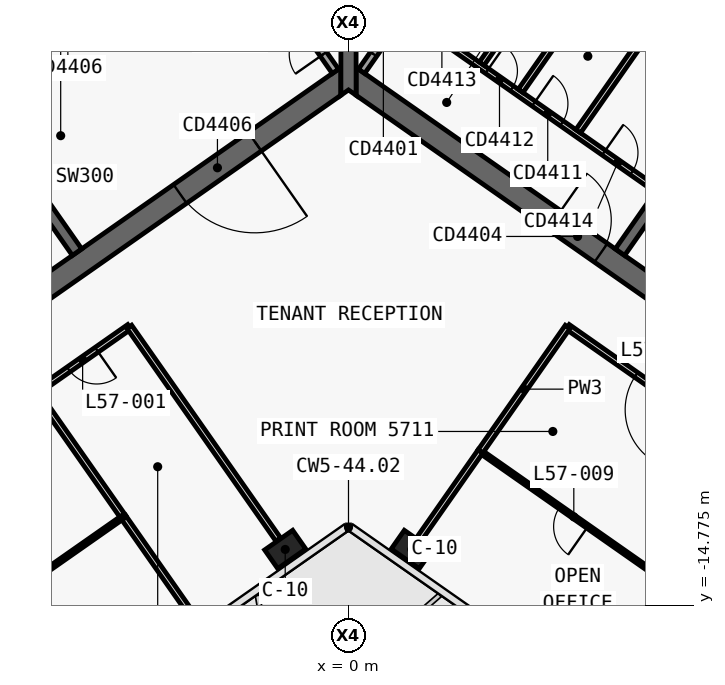
"""IFC4 building model, lengths in metres.
Left out: names, types, materials, properties, quantities, classifications, styles, units other than length and angle.
Written with IfcOpenShell. Run it as: python <this file> out.ifc"""

import sys

from ifc_helpers import new_model, si_unit, direction, frame, frame_2d, origin, origin_2d, place, context, subcontext, project, spatial, polyline, rectangle, outline, extrude, element, fill, save


model = new_model("IFC4")
c1 = context("Model", 3, precision=1e-05, world=origin(), true_north=direction((0.0, 1.0)))
c2 = subcontext(c1, "Body", "Model", "MODEL_VIEW")
j1 = project(units=[si_unit("LENGTHUNIT", "METRE"), si_unit("PLANEANGLEUNIT", "RADIAN")], contexts=[c1])
p1 = place(None, origin())
s1 = spatial("IfcSite", under=j1, at=p1, CompositionType="ELEMENT")
p2 = place(p1, origin())
s2 = spatial("IfcBuilding", under=s1, at=p2, CompositionType="ELEMENT")
p3 = place(p2, frame((0.0, 0.0, 244.9)))
s3 = spatial("IfcBuildingStorey", under=s2, at=p3, CompositionType="ELEMENT", Elevation=244.9)
p4 = place(p3, frame((-0.028, 12.066, 0.0), z_axis=(0.0, 0.0, 1.0), x_axis=(-0.819151382952, -0.573577380837, 0.0)))
e1 = element("IfcWall", 1, at=p4, inside=s3, PredefinedType="SHEAR", context=c2, shape_type="SweptSolid", body=[
    extrude(outline(polyline([(33.898, 0.3), (0.42, 0.3), (0.0, -0.3), (33.898, -0.3), (33.898, 0.3)])), origin(), (0.0, 0.0, 1.0), 3.9),
])
p5 = place(p3, frame((-0.028, -0.874, 0.0), z_axis=(0.0, 0.0, 1.0), x_axis=(-0.819150035022, -0.573579305871, 0.0)))
e2 = element("IfcWall", 2, at=p5, inside=s3, PredefinedType="SHEAR", context=c2, shape_type="SweptSolid", body=[
    extrude(outline(polyline([(26.476, 0.3), (0.42, 0.3), (0.0, -0.3), (26.476, -0.3), (26.476, 0.3)])), origin(), (0.0, 0.0, 1.0), 3.9),
])
p6 = place(p5, frame((2.976, 0.0, 0.0)))
e3 = element("IfcOpeningElement", 3, at=p6, cuts=e2, PredefinedType="OPENING", context=c2, shape_type="SweptSolid", body=[
    extrude(rectangle(XDim=2.4, YDim=2.1, at=frame_2d((1.2, 1.05))), frame((0.0, 0.31, 0.0), z_axis=(0.0, -1.0, 0.0), x_axis=(1.0, 0.0, 0.0)), (0.0, 0.0, 1.0), 0.62),
])
p7 = place(p5, frame((11.776, 0.0, 0.0)))
e4 = element("IfcOpeningElement", 4, at=p7, cuts=e2, PredefinedType="OPENING", context=c2, shape_type="SweptSolid", body=[
    extrude(rectangle(XDim=2.4, YDim=2.1, at=frame_2d((1.2, 1.05))), frame((0.0, 0.31, 0.0), z_axis=(0.0, -1.0, 0.0), x_axis=(1.0, 0.0, 0.0)), (0.0, 0.0, 1.0), 0.62),
])
p8 = place(p3, frame((-7.143, -5.49, 0.0), z_axis=(0.0, 0.0, 1.0), x_axis=(-0.573617744349, 0.819123118565, 0.0)))
e5 = element("IfcWall", 5, at=p8, inside=s3, PredefinedType="SHEAR", context=c2, shape_type="SweptSolid", body=[
    extrude(outline(polyline([(4.85, 0.15), (0.0, 0.15), (0.0, -0.15), (4.85, -0.15), (4.85, 0.15)])), origin(), (0.0, 0.0, 1.0), 3.9),
])
p9 = place(p3, frame((-2.638, 3.768, 0.0), z_axis=(0.0, 0.0, 1.0), x_axis=(-0.819155014212, -0.573572194837, 0.0)))
e6 = element("IfcWall", 6, at=p9, inside=s3, PredefinedType="SHEAR", context=c2, shape_type="SweptSolid", body=[
    extrude(outline(polyline([(26.4, 0.15), (0.0, 0.15), (0.0, -0.15), (26.4, -0.15), (26.4, 0.15)])), origin(), (0.0, 0.0, 1.0), 3.9),
])
p10 = place(p9, frame((1.169, 0.0, 0.0)))
e7 = element("IfcOpeningElement", 7, at=p10, cuts=e6, PredefinedType="OPENING", context=c2, shape_type="SweptSolid", body=[
    extrude(rectangle(XDim=1.1, YDim=2.1, at=frame_2d((0.55, 1.05))), frame((0.0, 0.16, 0.0), z_axis=(0.0, -1.0, 0.0), x_axis=(1.0, 0.0, 0.0)), (0.0, 0.0, 1.0), 0.32),
])
p11 = place(p9, frame((3.206, 0.0, 0.0)))
e8 = element("IfcOpeningElement", 8, at=p11, cuts=e6, PredefinedType="OPENING", context=c2, shape_type="SweptSolid", body=[
    extrude(rectangle(XDim=1.1, YDim=2.1, at=frame_2d((0.55, 1.05))), frame((0.0, 0.16, 0.0), z_axis=(0.0, -1.0, 0.0), x_axis=(1.0, 0.0, 0.0)), (0.0, 0.0, 1.0), 0.32),
])
p12 = place(p9, frame((5.244, 0.0, 0.0)))
e9 = element("IfcOpeningElement", 9, at=p12, cuts=e6, PredefinedType="OPENING", context=c2, shape_type="SweptSolid", body=[
    extrude(rectangle(XDim=1.1, YDim=2.1, at=frame_2d((0.55, 1.05))), frame((0.0, 0.16, 0.0), z_axis=(0.0, -1.0, 0.0), x_axis=(1.0, 0.0, 0.0)), (0.0, 0.0, 1.0), 0.32),
])
p13 = place(p9, frame((7.281, 0.0, 0.0)))
e10 = element("IfcOpeningElement", 10, at=p13, cuts=e6, PredefinedType="OPENING", context=c2, shape_type="SweptSolid", body=[
    extrude(rectangle(XDim=1.1, YDim=2.1, at=frame_2d((0.55, 1.05))), frame((0.0, 0.16, 0.0), z_axis=(0.0, -1.0, 0.0), x_axis=(1.0, 0.0, 0.0)), (0.0, 0.0, 1.0), 0.32),
])
p14 = place(p9, frame((9.688, 0.0, 0.0)))
e11 = element("IfcOpeningElement", 11, at=p14, cuts=e6, PredefinedType="OPENING", context=c2, shape_type="SweptSolid", body=[
    extrude(rectangle(XDim=1.1, YDim=2.1, at=frame_2d((0.55, 1.05))), frame((0.0, 0.16, 0.0), z_axis=(0.0, -1.0, 0.0), x_axis=(1.0, 0.0, 0.0)), (0.0, 0.0, 1.0), 0.32),
])
p15 = place(p9, frame((11.863, 0.0, 0.0)))
e12 = element("IfcOpeningElement", 12, at=p15, cuts=e6, PredefinedType="OPENING", context=c2, shape_type="SweptSolid", body=[
    extrude(rectangle(XDim=1.1, YDim=2.1, at=frame_2d((0.55, 1.05))), frame((0.0, 0.16, 0.0), z_axis=(0.0, -1.0, 0.0), x_axis=(1.0, 0.0, 0.0)), (0.0, 0.0, 1.0), 0.32),
])
p16 = place(p9, frame((14.552, 0.0, 0.0)))
e13 = element("IfcOpeningElement", 13, at=p16, cuts=e6, PredefinedType="OPENING", context=c2, shape_type="SweptSolid", body=[
    extrude(rectangle(XDim=1.0, YDim=2.1, at=frame_2d((0.5, 1.05))), frame((0.0, 0.16, 0.0), z_axis=(0.0, -1.0, 0.0), x_axis=(1.0, 0.0, 0.0)), (0.0, 0.0, 1.0), 0.32),
])
p17 = place(p9, frame((16.627, 0.0, 0.0)))
e14 = element("IfcOpeningElement", 14, at=p17, cuts=e6, PredefinedType="OPENING", context=c2, shape_type="SweptSolid", body=[
    extrude(rectangle(XDim=1.0, YDim=2.1, at=frame_2d((0.5, 1.05))), frame((0.0, 0.16, 0.0), z_axis=(0.0, -1.0, 0.0), x_axis=(1.0, 0.0, 0.0)), (0.0, 0.0, 1.0), 0.32),
])
p18 = place(p3, frame((0.028, 12.066, 0.0), z_axis=(0.0, 0.0, 1.0), x_axis=(0.819151382952, -0.573577380837, 0.0)))
e15 = element("IfcWall", 15, at=p18, inside=s3, PredefinedType="SHEAR", context=c2, shape_type="SweptSolid", body=[
    extrude(outline(polyline([(33.898, 0.3), (0.0, 0.3), (0.42, -0.3), (33.898, -0.3), (33.898, 0.3)])), origin(), (0.0, 0.0, 1.0), 3.9),
])
p19 = place(p3, frame((0.028, -0.874, 0.0), z_axis=(0.0, 0.0, 1.0), x_axis=(0.819150035022, -0.573579305871, 0.0)))
e16 = element("IfcWall", 16, at=p19, inside=s3, PredefinedType="SHEAR", context=c2, shape_type="SweptSolid", body=[
    extrude(outline(polyline([(26.476, 0.3), (0.0, 0.3), (0.42, -0.3), (26.476, -0.3), (26.476, 0.3)])), origin(), (0.0, 0.0, 1.0), 3.9),
])
p20 = place(p19, frame((6.576, 0.0, 0.0)))
e17 = element("IfcOpeningElement", 17, at=p20, cuts=e16, PredefinedType="OPENING", context=c2, shape_type="SweptSolid", body=[
    extrude(rectangle(XDim=1.5, YDim=2.1, at=frame_2d((0.75, 1.05))), frame((0.0, 0.31, 0.0), z_axis=(0.0, -1.0, 0.0), x_axis=(1.0, 0.0, 0.0)), (0.0, 0.0, 1.0), 0.62),
])
p21 = place(p19, frame((12.226, 0.0, 0.0)))
e18 = element("IfcOpeningElement", 18, at=p21, cuts=e16, PredefinedType="OPENING", context=c2, shape_type="SweptSolid", body=[
    extrude(rectangle(XDim=1.5, YDim=2.1, at=frame_2d((0.75, 1.05))), frame((0.0, 0.31, 0.0), z_axis=(0.0, -1.0, 0.0), x_axis=(1.0, 0.0, 0.0)), (0.0, 0.0, 1.0), 0.62),
])
p22 = place(p3, frame((7.143, -5.49, 0.0), z_axis=(0.0, 0.0, 1.0), x_axis=(0.573617744349, 0.819123118565, 0.0)))
e19 = element("IfcWall", 19, at=p22, inside=s3, PredefinedType="SHEAR", context=c2, shape_type="SweptSolid", body=[
    extrude(outline(polyline([(0.0, 0.15), (0.0, -0.15), (4.85, -0.15), (4.85, 0.15), (0.0, 0.15)])), origin(), (0.0, 0.0, 1.0), 3.9),
])
p23 = place(p3, frame((2.638, 3.768, 0.0), z_axis=(0.0, 0.0, 1.0), x_axis=(0.819155014212, -0.573572194837, 0.0)))
e20 = element("IfcWall", 20, at=p23, inside=s3, PredefinedType="SHEAR", context=c2, shape_type="SweptSolid", body=[
    extrude(outline(polyline([(0.0, 0.15), (0.0, -0.15), (26.4, -0.15), (26.4, 0.15), (0.0, 0.15)])), origin(), (0.0, 0.0, 1.0), 3.9),
])
p24 = place(p23, frame((9.637, 0.0, 0.0)))
e21 = element("IfcOpeningElement", 21, at=p24, cuts=e20, PredefinedType="OPENING", context=c2, shape_type="SweptSolid", body=[
    extrude(rectangle(XDim=1.2, YDim=2.1, at=frame_2d((0.6, 1.05))), frame((0.0, 0.16, 0.0), z_axis=(0.0, -1.0, 0.0), x_axis=(1.0, 0.0, 0.0)), (0.0, 0.0, 1.0), 0.32),
])
p25 = place(p23, frame((11.812, 0.0, 0.0)))
e22 = element("IfcOpeningElement", 22, at=p25, cuts=e20, PredefinedType="OPENING", context=c2, shape_type="SweptSolid", body=[
    extrude(rectangle(XDim=1.2, YDim=2.1, at=frame_2d((0.6, 1.05))), frame((0.0, 0.16, 0.0), z_axis=(0.0, -1.0, 0.0), x_axis=(1.0, 0.0, 0.0)), (0.0, 0.0, 1.0), 0.32),
])
p26 = place(p23, frame((13.988, 0.0, 0.0)))
e23 = element("IfcOpeningElement", 23, at=p26, cuts=e20, PredefinedType="OPENING", context=c2, shape_type="SweptSolid", body=[
    extrude(rectangle(XDim=1.2, YDim=2.1, at=frame_2d((0.6, 1.05))), frame((0.0, 0.16, 0.0), z_axis=(0.0, -1.0, 0.0), x_axis=(1.0, 0.0, 0.0)), (0.0, 0.0, 1.0), 0.32),
])
p27 = place(p23, frame((16.262, 0.0, 0.0)))
e24 = element("IfcOpeningElement", 24, at=p27, cuts=e20, PredefinedType="OPENING", context=c2, shape_type="SweptSolid", body=[
    extrude(rectangle(XDim=1.0, YDim=2.1, at=frame_2d((0.5, 1.05))), frame((0.0, 0.16, 0.0), z_axis=(0.0, -1.0, 0.0), x_axis=(1.0, 0.0, 0.0)), (0.0, 0.0, 1.0), 0.32),
])
p28 = place(p3, frame((0.0, -1.361, 0.0), z_axis=(0.0, 0.0, 1.0), x_axis=(0.0, 1.0, 0.0)))
e25 = element("IfcWall", 25, at=p28, inside=s3, PredefinedType="SHEAR", context=c2, shape_type="SweptSolid", body=[
    extrude(outline(polyline([(0.14, 0.2), (0.0, 0.2), (0.14, 0.0), (0.0, -0.2), (0.14, -0.2), (1.012, -0.2), (12.94, -0.2), (13.813, -0.2), (13.893, -0.2), (13.933, -0.172), (13.813, 0.0), (13.933, 0.172), (13.893, 0.2), (13.813, 0.2), (12.94, 0.2), (1.012, 0.2), (0.14, 0.2)])), origin(), (0.0, 0.0, 1.0), 3.9),
])
for number, where, z_axis, x_axis in (
    (26, (-1.665, -13.313, 0.0), (0.0, 0.0, 1.0), (-0.819, -0.574, 0.0)),
    (27, (1.665, -13.313, 0.0), (0.0, 0.0, 1.0), (0.819, -0.574, 0.0)),
):
    element("IfcColumn", number, at=place(p3, frame(where, z_axis=z_axis, x_axis=x_axis)), inside=s3, PredefinedType="COLUMN", context=c2, shape_type="SweptSolid", body=[
        extrude(rectangle(XDim=0.9, YDim=0.6, at=origin_2d()), origin(), (0.0, 0.0, 1.0), 3.9),
    ])
p29 = place(p3, frame((1.516, 0.77, 0.0), z_axis=(0.0, 0.0, 1.0), x_axis=(0.819146424436, -0.573584462249, 0.0)))
e28 = element("IfcWall", 28, at=p29, inside=s3, PredefinedType="PARTITIONING", context=c2, shape_type="SweptSolid", body=[
    extrude(rectangle(XDim=8.05, YDim=0.15, at=frame_2d((4.025, 0.0))), origin(), (0.0, 0.0, 1.0), 3.62),
])
p30 = place(p29, frame((0.7, 0.0, 0.0)))
e29 = element("IfcOpeningElement", 29, at=p30, cuts=e28, PredefinedType="OPENING", context=c2, shape_type="SweptSolid", body=[
    extrude(rectangle(XDim=0.9, YDim=2.1, at=frame_2d((0.45, 1.05))), frame((0.0, 0.085, 0.0), z_axis=(0.0, -1.0, 0.0), x_axis=(1.0, 0.0, 0.0)), (0.0, 0.0, 1.0), 0.17),
])
p31 = place(p29, frame((2.6, 0.0, 0.0)))
e30 = element("IfcOpeningElement", 30, at=p31, cuts=e28, PredefinedType="OPENING", context=c2, shape_type="SweptSolid", body=[
    extrude(rectangle(XDim=0.8, YDim=2.1, at=frame_2d((0.4, 1.05))), frame((0.0, 0.085, 0.0), z_axis=(0.0, -1.0, 0.0), x_axis=(1.0, 0.0, 0.0)), (0.0, 0.0, 1.0), 0.17),
])
p32 = place(p29, frame((4.1, 0.0, 0.0)))
e31 = element("IfcOpeningElement", 31, at=p32, cuts=e28, PredefinedType="OPENING", context=c2, shape_type="SweptSolid", body=[
    extrude(rectangle(XDim=0.9, YDim=2.1, at=frame_2d((0.45, 1.05))), frame((0.0, 0.085, 0.0), z_axis=(0.0, -1.0, 0.0), x_axis=(1.0, 0.0, 0.0)), (0.0, 0.0, 1.0), 0.17),
])
p33 = place(p29, frame((6.35, 0.0, 0.0)))
e32 = element("IfcOpeningElement", 32, at=p33, cuts=e28, PredefinedType="OPENING", context=c2, shape_type="SweptSolid", body=[
    extrude(rectangle(XDim=0.9, YDim=2.1, at=frame_2d((0.45, 1.05))), frame((0.0, 0.085, 0.0), z_axis=(0.0, -1.0, 0.0), x_axis=(1.0, 0.0, 0.0)), (0.0, 0.0, 1.0), 0.17),
])
p34 = place(p3, frame((3.504, -0.531, 0.0), z_axis=(0.0, 0.0, 1.0), x_axis=(0.573582013179, 0.819148139324, 0.0)))
e33 = element("IfcWall", 33, at=p34, inside=s3, PredefinedType="PARTITIONING", context=c2, shape_type="SweptSolid", body=[
    extrude(rectangle(XDim=2.875, YDim=0.15, at=frame_2d((1.438, 0.0))), origin(), (0.0, 0.0, 1.0), 3.62),
])
p35 = place(p3, frame((4.528, -1.248, 0.0), z_axis=(0.0, 0.0, 1.0), x_axis=(0.573621911162, 0.819120200602, 0.0)))
e34 = element("IfcWall", 34, at=p35, inside=s3, PredefinedType="PARTITIONING", context=c2, shape_type="SweptSolid", body=[
    extrude(rectangle(XDim=2.875, YDim=0.15, at=frame_2d((1.438, 0.0))), origin(), (0.0, 0.0, 1.0), 3.62),
])
p36 = place(p3, frame((6.044, -2.309, 0.0), z_axis=(0.0, 0.0, 1.0), x_axis=(0.573564930514, 0.819160100642, 0.0)))
e35 = element("IfcWall", 35, at=p36, inside=s3, PredefinedType="PARTITIONING", context=c2, shape_type="SweptSolid", body=[
    extrude(rectangle(XDim=2.875, YDim=0.15, at=frame_2d((1.438, 0.0))), origin(), (0.0, 0.0, 1.0), 3.62),
])
p37 = place(p3, frame((-0.344, -0.729, 0.0), z_axis=(0.0, 0.0, 1.0), x_axis=(-0.573560315113, 0.819163332265, 0.0)))
e36 = element("IfcWall", 36, at=p37, inside=s3, PredefinedType="SOLIDWALL", context=c2, shape_type="SweptSolid", body=[
    extrude(rectangle(XDim=4.85, YDim=0.2, at=frame_2d((2.425, 0.0))), origin(), (0.0, 0.0, 1.0), 3.62),
])
p38 = place(p37, frame((0.55, 0.0, 0.0)))
e37 = element("IfcOpeningElement", 37, at=p38, cuts=e36, PredefinedType="OPENING", context=c2, shape_type="SweptSolid", body=[
    extrude(rectangle(XDim=0.9, YDim=2.1, at=frame_2d((0.45, 1.05))), frame((0.0, 0.11, 0.0), z_axis=(0.0, -1.0, 0.0), x_axis=(1.0, 0.0, 0.0)), (0.0, 0.0, 1.0), 0.22),
])
p39 = place(p3, frame((0.344, -0.729, 0.0), z_axis=(0.0, 0.0, 1.0), x_axis=(0.573560315113, 0.819163332265, 0.0)))
e38 = element("IfcWall", 38, at=p39, inside=s3, PredefinedType="SOLIDWALL", context=c2, shape_type="SweptSolid", body=[
    extrude(rectangle(XDim=4.85, YDim=0.2, at=frame_2d((2.425, 0.0))), origin(), (0.0, 0.0, 1.0), 3.62),
])
p40 = place(p39, frame((0.55, 0.0, 0.0)))
e39 = element("IfcOpeningElement", 39, at=p40, cuts=e38, PredefinedType="OPENING", context=c2, shape_type="SweptSolid", body=[
    extrude(rectangle(XDim=0.9, YDim=2.1, at=frame_2d((0.45, 1.05))), frame((0.0, 0.11, 0.0), z_axis=(0.0, -1.0, 0.0), x_axis=(1.0, 0.0, 0.0)), (0.0, 0.0, 1.0), 0.22),
])
p41 = place(p3, frame((10.683, -10.898, 0.0), z_axis=(0.0, 0.0, 1.0), x_axis=(-0.819147828287, 0.573582457378, 0.0)))
e40 = element("IfcWall", 40, at=p41, inside=s3, PredefinedType="PARTITIONING", context=c2, shape_type="SweptSolid", body=[
    extrude(rectangle(XDim=6.002, YDim=0.15, at=frame_2d((3.001, 0.0))), origin(), (0.0, 0.0, 1.0), 3.05),
])
p42 = place(p41, frame((2.201, 0.0, 0.0)))
e41 = element("IfcOpeningElement", 41, at=p42, cuts=e40, PredefinedType="OPENING", context=c2, shape_type="SweptSolid", body=[
    extrude(rectangle(XDim=1.6, YDim=2.1, at=frame_2d((0.8, 1.05))), frame((0.0, 0.085, 0.0), z_axis=(0.0, -1.0, 0.0), x_axis=(1.0, 0.0, 0.0)), (0.0, 0.0, 1.0), 0.17),
])
p43 = place(p3, frame((-5.766, -7.456, 0.0), z_axis=(0.0, 0.0, 1.0), x_axis=(-0.81915932427, -0.57356603932, 0.0)))
e42 = element("IfcWall", 42, at=p43, inside=s3, PredefinedType="PARTITIONING", context=c2, shape_type="SweptSolid", body=[
    extrude(rectangle(XDim=3.002, YDim=0.15, at=frame_2d((1.501, 0.0))), origin(), (0.0, 0.0, 1.0), 3.05),
])
p44 = place(p43, frame((1.051, 0.0, 0.0)))
e43 = element("IfcOpeningElement", 43, at=p44, cuts=e42, PredefinedType="OPENING", context=c2, shape_type="SweptSolid", body=[
    extrude(rectangle(XDim=0.9, YDim=2.1, at=frame_2d((0.45, 1.05))), frame((0.0, 0.085, 0.0), z_axis=(0.0, -1.0, 0.0), x_axis=(1.0, 0.0, 0.0)), (0.0, 0.0, 1.0), 0.17),
])
p45 = place(p3, frame((8.386, -14.175, 0.0), z_axis=(0.0, 0.0, 1.0), x_axis=(-0.819143979704, 0.5735879536, 0.0)))
e44 = element("IfcWall", 44, at=p45, inside=s3, PredefinedType="PARTITIONING", context=c2, shape_type="SweptSolid", body=[
    extrude(rectangle(XDim=6.0, YDim=0.1, at=frame_2d((3.0, 0.0))), origin(), (0.0, 0.0, 1.0), 3.05),
])
p46 = place(p45, frame((2.55, 0.0, 0.0)))
e45 = element("IfcOpeningElement", 45, at=p46, cuts=e44, PredefinedType="OPENING", context=c2, shape_type="SweptSolid", body=[
    extrude(rectangle(XDim=0.9, YDim=2.1, at=frame_2d((0.45, 1.05))), frame((0.0, 0.06, 0.0), z_axis=(0.0, -1.0, 0.0), x_axis=(1.0, 0.0, 0.0)), (0.0, 0.0, 1.0), 0.12),
])
p47 = place(p3, frame((8.386, -14.175, 0.0), z_axis=(0.0, 0.0, 1.0), x_axis=(-0.573602818234, -0.819133570863, 0.0)))
e46 = element("IfcWall", 46, at=p47, inside=s3, PredefinedType="PARTITIONING", context=c2, shape_type="SweptSolid", body=[
    extrude(rectangle(XDim=3.499, YDim=0.15, at=frame_2d((1.75, 0.0))), origin(), (0.0, 0.0, 1.0), 3.0),
])
p48 = place(p3, frame((1.849, -13.051, 0.0), z_axis=(0.0, 0.0, 1.0), x_axis=(0.573555012677, 0.819167044889, 0.0)))
e47 = element("IfcWall", 47, at=p48, inside=s3, PredefinedType="PARTITIONING", context=c2, shape_type="SweptSolid", body=[
    extrude(rectangle(XDim=2.829, YDim=0.15, at=frame_2d((1.415, 0.0))), origin(), (0.0, 0.0, 1.0), 3.05),
])
p49 = place(p3, frame((3.472, -10.732, 0.0), z_axis=(0.0, 0.0, 1.0), x_axis=(0.573597512525, 0.819137286189, 0.0)))
e48 = element("IfcWall", 48, at=p49, inside=s3, PredefinedType="PARTITIONING", context=c2, shape_type="SweptSolid", body=[
    extrude(rectangle(XDim=4.0, YDim=0.15, at=frame_2d((2.0, 0.0))), origin(), (0.0, 0.0, 1.0), 3.05),
])
p50 = place(p3, frame((-1.849, -13.051, 0.0), z_axis=(0.0, 0.0, 1.0), x_axis=(-0.57357985571, 0.819149650018, 0.0)))
e49 = element("IfcWall", 49, at=p50, inside=s3, PredefinedType="PARTITIONING", context=c2, shape_type="SweptSolid", body=[
    extrude(rectangle(XDim=6.832, YDim=0.15, at=frame_2d((3.416, 0.0))), origin(), (0.0, 0.0, 1.0), 3.05),
])
p51 = place(p3, frame((-3.922, -15.32, 0.0), z_axis=(0.0, 0.0, 1.0), x_axis=(-0.573560622794, 0.819163116834, 0.0)))
e50 = element("IfcWall", 50, at=p51, inside=s3, PredefinedType="PARTITIONING", context=c2, shape_type="SweptSolid", body=[
    extrude(rectangle(XDim=3.501, YDim=0.15, at=frame_2d((1.75, 0.0))), origin(), (0.0, 0.0, 1.0), 3.0),
])
p52 = place(p3, frame((-5.928, -12.455, 0.0), z_axis=(0.0, 0.0, 1.0), x_axis=(-0.573560601885, 0.819163131473, 0.0)))
e51 = element("IfcWall", 51, at=p52, inside=s3, PredefinedType="PARTITIONING", context=c2, shape_type="SweptSolid", body=[
    extrude(rectangle(XDim=4.002, YDim=0.15, at=frame_2d((2.001, 0.0))), origin(), (0.0, 0.0, 1.0), 3.62),
])
p53 = place(p3, frame((-5.929, -12.454, 0.0), z_axis=(0.0, 0.0, 1.0), x_axis=(-0.819155448096, -0.573571575181, 0.0)))
e52 = element("IfcWall", 52, at=p53, inside=s3, PredefinedType="PARTITIONING", context=c2, shape_type="SweptSolid", body=[
    extrude(rectangle(XDim=10.5, YDim=0.1, at=frame_2d((5.25, 0.0))), origin(), (0.0, 0.0, 1.0), 3.05),
])
p54 = place(p53, frame((4.8, 0.0, 0.0)))
e53 = element("IfcOpeningElement", 53, at=p54, cuts=e52, PredefinedType="OPENING", context=c2, shape_type="SweptSolid", body=[
    extrude(rectangle(XDim=0.9, YDim=2.1, at=frame_2d((0.45, 1.05))), frame((0.0, 0.06, 0.0), z_axis=(0.0, -1.0, 0.0), x_axis=(1.0, 0.0, 0.0)), (0.0, 0.0, 1.0), 0.12),
])
p55 = place(p6, origin())
e54 = element("IfcDoor", 54, at=p55, inside=s3, OperationType="DOUBLE_DOOR_SINGLE_SWING", PredefinedType="DOOR", context=c2, shape_type="SweptSolid", body=[
    extrude(rectangle(XDim=2.4, YDim=2.1, at=frame_2d((1.2, 1.05))), frame((0.0, 0.025, 0.0), z_axis=(0.0, -1.0, 0.0), x_axis=(1.0, 0.0, 0.0)), (0.0, 0.0, 1.0), 0.05),
])
fill(e3, e54)
p56 = place(p31, origin())
e55 = element("IfcDoor", 55, at=p56, inside=s3, OperationType="SINGLE_SWING_RIGHT", PredefinedType="DOOR", context=c2, shape_type="SweptSolid", body=[
    extrude(rectangle(XDim=0.8, YDim=2.1, at=frame_2d((0.4, 1.05))), frame((0.0, 0.025, 0.0), z_axis=(0.0, -1.0, 0.0), x_axis=(1.0, 0.0, 0.0)), (0.0, 0.0, 1.0), 0.05),
])
fill(e30, e55)
p57 = place(p32, origin())
e56 = element("IfcDoor", 56, at=p57, inside=s3, OperationType="SINGLE_SWING_RIGHT", PredefinedType="DOOR", context=c2, shape_type="SweptSolid", body=[
    extrude(rectangle(XDim=0.9, YDim=2.1, at=frame_2d((0.45, 1.05))), frame((0.0, 0.025, 0.0), z_axis=(0.0, -1.0, 0.0), x_axis=(1.0, 0.0, 0.0)), (0.0, 0.0, 1.0), 0.05),
])
fill(e31, e56)
p58 = place(p33, origin())
e57 = element("IfcDoor", 57, at=p58, inside=s3, OperationType="SINGLE_SWING_RIGHT", PredefinedType="DOOR", context=c2, shape_type="SweptSolid", body=[
    extrude(rectangle(XDim=0.9, YDim=2.1, at=frame_2d((0.45, 1.05))), frame((0.0, 0.025, 0.0), z_axis=(0.0, -1.0, 0.0), x_axis=(1.0, 0.0, 0.0)), (0.0, 0.0, 1.0), 0.05),
])
fill(e32, e57)
p59 = place(p20, origin())
e58 = element("IfcDoor", 58, at=p59, inside=s3, OperationType="SINGLE_SWING_RIGHT", PredefinedType="DOOR", context=c2, shape_type="SweptSolid", body=[
    extrude(rectangle(XDim=1.5, YDim=2.1, at=frame_2d((0.75, 1.05))), frame((0.0, 0.025, 0.0), z_axis=(0.0, -1.0, 0.0), x_axis=(1.0, 0.0, 0.0)), (0.0, 0.0, 1.0), 0.05),
])
fill(e17, e58)
p60 = place(p38, origin())
e59 = element("IfcDoor", 59, at=p60, inside=s3, OperationType="SINGLE_SWING_RIGHT", PredefinedType="DOOR", context=c2, shape_type="SweptSolid", body=[
    extrude(rectangle(XDim=0.9, YDim=2.1, at=frame_2d((0.45, 1.05))), frame((0.0, 0.025, 0.0), z_axis=(0.0, -1.0, 0.0), x_axis=(1.0, 0.0, 0.0)), (0.0, 0.0, 1.0), 0.05),
])
fill(e37, e59)
p61 = place(p40, origin())
e60 = element("IfcDoor", 60, at=p61, inside=s3, OperationType="SINGLE_SWING_RIGHT", PredefinedType="DOOR", context=c2, shape_type="SweptSolid", body=[
    extrude(rectangle(XDim=0.9, YDim=2.1, at=frame_2d((0.45, 1.05))), frame((0.0, 0.025, 0.0), z_axis=(0.0, -1.0, 0.0), x_axis=(1.0, 0.0, 0.0)), (0.0, 0.0, 1.0), 0.05),
])
fill(e39, e60)
p62 = place(p44, origin())
e61 = element("IfcDoor", 61, at=p62, inside=s3, OperationType="SINGLE_SWING_RIGHT", PredefinedType="DOOR", context=c2, shape_type="SweptSolid", body=[
    extrude(rectangle(XDim=0.9, YDim=2.1, at=frame_2d((0.45, 1.05))), frame((0.0, 0.025, 0.0), z_axis=(0.0, -1.0, 0.0), x_axis=(1.0, 0.0, 0.0)), (0.0, 0.0, 1.0), 0.05),
])
fill(e43, e61)
p63 = place(p42, origin())
e62 = element("IfcDoor", 62, at=p63, inside=s3, OperationType="DOUBLE_DOOR_SINGLE_SWING", PredefinedType="DOOR", context=c2, shape_type="SweptSolid", body=[
    extrude(rectangle(XDim=1.6, YDim=2.1, at=frame_2d((0.8, 1.05))), frame((0.0, 0.025, 0.0), z_axis=(0.0, -1.0, 0.0), x_axis=(1.0, 0.0, 0.0)), (0.0, 0.0, 1.0), 0.05),
])
fill(e41, e62)
p64 = place(p46, origin())
e63 = element("IfcDoor", 63, at=p64, inside=s3, OperationType="SINGLE_SWING_LEFT", PredefinedType="DOOR", context=c2, shape_type="SweptSolid", body=[
    extrude(rectangle(XDim=0.9, YDim=2.1, at=frame_2d((0.45, 1.05))), frame((0.0, 0.025, 0.0), z_axis=(0.0, -1.0, 0.0), x_axis=(1.0, 0.0, 0.0)), (0.0, 0.0, 1.0), 0.05),
])
fill(e45, e63)
save(model, sys.argv[1])
